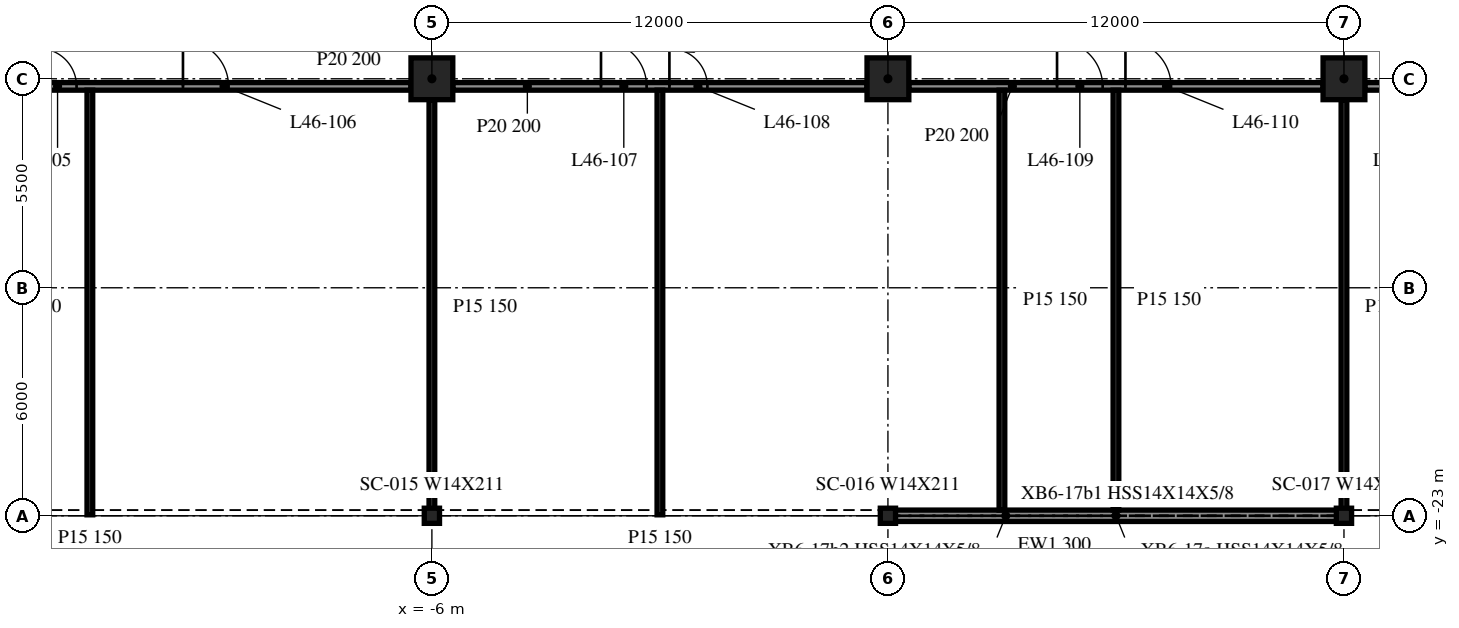
"""IFC4 building model, lengths in metres.
Left out: names, types, materials, properties, quantities, classifications, styles, units other than length and angle.
Written with IfcOpenShell. Run it as: python <this file> out.ifc"""

import sys

from ifc_helpers import new_model, si_unit, direction, frame, frame_2d, origin, origin_2d, place, context, subcontext, project, spatial, rectangle, i_section, extrude, element, fill, save


model = new_model("IFC4")
c1 = context("Model", 3, precision=1e-05, world=origin(), true_north=direction((0.0, 1.0)))
c2 = subcontext(c1, "Body", "Model", "MODEL_VIEW")
j1 = project(units=[si_unit("LENGTHUNIT", "METRE"), si_unit("PLANEANGLEUNIT", "RADIAN")], contexts=[c1])
p1 = place(None, origin())
s1 = spatial("IfcSite", under=j1, at=p1, CompositionType="ELEMENT")
p2 = place(p1, origin())
s2 = spatial("IfcBuilding", under=s1, at=p2, CompositionType="ELEMENT")
p3 = place(p2, frame((0.0, 0.0, 193.9)))
s3 = spatial("IfcBuildingStorey", under=s2, at=p3, CompositionType="ELEMENT", Elevation=193.9)
for number, where, z_axis, x_axis in (
    (1, (-6.0, -11.5, -0.34), (0.0, 0.0, 1.0), (1.0, 0.0, 0.0)),
    (2, (6.0, -11.5, -0.34), (0.0, 0.0, 1.0), (1.0, 0.0, 0.0)),
    (3, (18.0, -11.5, -0.34), (0.0, 0.0, 1.0), (1.0, 0.0, 0.0)),
):
    element("IfcColumn", number, at=place(p3, frame(where, z_axis=z_axis, x_axis=x_axis)), inside=s3, PredefinedType="COLUMN", context=c2, shape_type="SweptSolid", body=[
        extrude(rectangle(XDim=1.1, YDim=1.1, at=origin_2d()), origin(), (0.0, 0.0, 1.0), 3.8),
    ])
for number, where, z_axis, x_axis in (
    (4, (-6.0, -23.0, -0.34), (0.0, 0.0, 1.0), (1.0, 0.0, 0.0)),
    (5, (6.0, -23.0, -0.34), (0.0, 0.0, 1.0), (1.0, 0.0, 0.0)),
    (6, (18.0, -23.0, -0.34), (0.0, 0.0, 1.0), (1.0, 0.0, 0.0)),
):
    element("IfcColumn", number, at=place(p3, frame(where, z_axis=z_axis, x_axis=x_axis)), inside=s3, PredefinedType="COLUMN", context=c2, shape_type="SweptSolid", body=[
        extrude(i_section(OverallWidth=0.401, OverallDepth=0.399, WebThickness=0.025, FlangeThickness=0.04, at=origin_2d()), origin(), (0.0, 0.0, 1.0), 3.8),
    ])
p4 = place(p3, frame((6.012, -23.0, 0.0), z_axis=(0.0, 0.0, 1.0), x_axis=(1.0, 0.0, 0.0)))
e7 = element("IfcWall", 7, at=p4, inside=s3, PredefinedType="NOTDEFINED", context=c2, shape_type="SweptSolid", body=[
    extrude(rectangle(XDim=11.975, YDim=0.3, at=frame_2d((5.988, 0.0))), origin(), (0.0, 0.0, 1.0), 2.782),
])
p5 = place(p3, frame((-17.45, -11.7, 0.0), z_axis=(0.0, 0.0, 1.0), x_axis=(1.0, 0.0, 0.0)))
e8 = element("IfcWall", 8, at=p5, inside=s3, PredefinedType="PARTITIONING", context=c2, shape_type="SweptSolid", body=[
    extrude(rectangle(XDim=10.9, YDim=0.2, at=frame_2d((5.45, 0.0))), origin(), (0.0, 0.0, 1.0), 3.46),
])
p6 = place(p5, frame((1.1, 0.0, 0.0)))
e9 = element("IfcOpeningElement", 9, at=p6, cuts=e8, PredefinedType="OPENING", context=c2, shape_type="SweptSolid", body=[
    extrude(rectangle(XDim=1.0, YDim=2.1, at=frame_2d((0.5, 1.05))), frame((0.0, 0.11, 0.0), z_axis=(0.0, -1.0, 0.0), x_axis=(1.0, 0.0, 0.0)), (0.0, 0.0, 1.0), 0.22),
])
p7 = place(p5, frame((4.9, 0.0, 0.0)))
e10 = element("IfcOpeningElement", 10, at=p7, cuts=e8, PredefinedType="OPENING", context=c2, shape_type="SweptSolid", body=[
    extrude(rectangle(XDim=1.2, YDim=2.1, at=frame_2d((0.6, 1.05))), frame((0.0, 0.11, 0.0), z_axis=(0.0, -1.0, 0.0), x_axis=(1.0, 0.0, 0.0)), (0.0, 0.0, 1.0), 0.22),
])
p8 = place(p3, frame((-5.45, -11.7, 0.0), z_axis=(0.0, 0.0, 1.0), x_axis=(1.0, 0.0, 0.0)))
e11 = element("IfcWall", 11, at=p8, inside=s3, PredefinedType="PARTITIONING", context=c2, shape_type="SweptSolid", body=[
    extrude(rectangle(XDim=10.9, YDim=0.2, at=frame_2d((5.45, 0.0))), origin(), (0.0, 0.0, 1.0), 3.46),
])
p9 = place(p8, frame((3.9, 0.0, 0.0)))
e12 = element("IfcOpeningElement", 12, at=p9, cuts=e11, PredefinedType="OPENING", context=c2, shape_type="SweptSolid", body=[
    extrude(rectangle(XDim=1.2, YDim=2.1, at=frame_2d((0.6, 1.05))), frame((0.0, 0.11, 0.0), z_axis=(0.0, -1.0, 0.0), x_axis=(1.0, 0.0, 0.0)), (0.0, 0.0, 1.0), 0.22),
])
p10 = place(p8, frame((5.7, 0.0, 0.0)))
e13 = element("IfcOpeningElement", 13, at=p10, cuts=e11, PredefinedType="OPENING", context=c2, shape_type="SweptSolid", body=[
    extrude(rectangle(XDim=1.0, YDim=2.1, at=frame_2d((0.5, 1.05))), frame((0.0, 0.11, 0.0), z_axis=(0.0, -1.0, 0.0), x_axis=(1.0, 0.0, 0.0)), (0.0, 0.0, 1.0), 0.22),
])
p11 = place(p3, frame((6.55, -11.7, 0.0), z_axis=(0.0, 0.0, 1.0), x_axis=(1.0, 0.0, 0.0)))
e14 = element("IfcWall", 14, at=p11, inside=s3, PredefinedType="PARTITIONING", context=c2, shape_type="SweptSolid", body=[
    extrude(rectangle(XDim=10.9, YDim=0.2, at=frame_2d((5.45, 0.0))), origin(), (0.0, 0.0, 1.0), 3.46),
])
p12 = place(p11, frame((3.9, 0.0, 0.0)))
e15 = element("IfcOpeningElement", 15, at=p12, cuts=e14, PredefinedType="OPENING", context=c2, shape_type="SweptSolid", body=[
    extrude(rectangle(XDim=1.2, YDim=2.1, at=frame_2d((0.6, 1.05))), frame((0.0, 0.11, 0.0), z_axis=(0.0, -1.0, 0.0), x_axis=(1.0, 0.0, 0.0)), (0.0, 0.0, 1.0), 0.22),
])
p13 = place(p11, frame((5.7, 0.0, 0.0)))
e16 = element("IfcOpeningElement", 16, at=p13, cuts=e14, PredefinedType="OPENING", context=c2, shape_type="SweptSolid", body=[
    extrude(rectangle(XDim=1.2, YDim=2.1, at=frame_2d((0.6, 1.05))), frame((0.0, 0.11, 0.0), z_axis=(0.0, -1.0, 0.0), x_axis=(1.0, 0.0, 0.0)), (0.0, 0.0, 1.0), 0.22),
])
p14 = place(p3, frame((18.55, -11.7, 0.0), z_axis=(0.0, 0.0, 1.0), x_axis=(1.0, 0.0, 0.0)))
e17 = element("IfcWall", 17, at=p14, inside=s3, PredefinedType="PARTITIONING", context=c2, shape_type="SweptSolid", body=[
    extrude(rectangle(XDim=10.9, YDim=0.2, at=frame_2d((5.45, 0.0))), origin(), (0.0, 0.0, 1.0), 3.46),
])
p15 = place(p14, frame((1.1, 0.0, 0.0)))
e18 = element("IfcOpeningElement", 18, at=p15, cuts=e17, PredefinedType="OPENING", context=c2, shape_type="SweptSolid", body=[
    extrude(rectangle(XDim=1.0, YDim=2.1, at=frame_2d((0.5, 1.05))), frame((0.0, 0.11, 0.0), z_axis=(0.0, -1.0, 0.0), x_axis=(1.0, 0.0, 0.0)), (0.0, 0.0, 1.0), 0.22),
])
p16 = place(p14, frame((4.9, 0.0, 0.0)))
e19 = element("IfcOpeningElement", 19, at=p16, cuts=e17, PredefinedType="OPENING", context=c2, shape_type="SweptSolid", body=[
    extrude(rectangle(XDim=1.2, YDim=2.1, at=frame_2d((0.6, 1.05))), frame((0.0, 0.11, 0.0), z_axis=(0.0, -1.0, 0.0), x_axis=(1.0, 0.0, 0.0)), (0.0, 0.0, 1.0), 0.22),
])
p17 = place(p3, frame((-15.0, -22.975, 0.0), z_axis=(0.0, 0.0, 1.0), x_axis=(0.0, 1.0, 0.0)))
e20 = element("IfcWall", 20, at=p17, inside=s3, PredefinedType="PARTITIONING", context=c2, shape_type="SweptSolid", body=[
    extrude(rectangle(XDim=11.175, YDim=0.15, at=frame_2d((5.587, 0.0))), origin(), (0.0, 0.0, 1.0), 3.46),
])
p18 = place(p3, frame((-6.0, -22.975, 0.0), z_axis=(0.0, 0.0, 1.0), x_axis=(0.0, 1.0, 0.0)))
e21 = element("IfcWall", 21, at=p18, inside=s3, PredefinedType="PARTITIONING", context=c2, shape_type="SweptSolid", body=[
    extrude(rectangle(XDim=10.925, YDim=0.15, at=frame_2d((5.462, 0.0))), origin(), (0.0, 0.0, 1.0), 3.46),
])
p19 = place(p3, frame((0.0, -22.975, 0.0), z_axis=(0.0, 0.0, 1.0), x_axis=(0.0, 1.0, 0.0)))
e22 = element("IfcWall", 22, at=p19, inside=s3, PredefinedType="PARTITIONING", context=c2, shape_type="SweptSolid", body=[
    extrude(rectangle(XDim=11.175, YDim=0.15, at=frame_2d((5.587, 0.0))), origin(), (0.0, 0.0, 1.0), 3.46),
])
for number, where, z_axis, x_axis in (
    (23, (9.0, -22.85, 0.0), (0.0, 0.0, 1.0), (0.0, 1.0, 0.0)),
    (24, (12.0, -22.85, 0.0), (0.0, 0.0, 1.0), (0.0, 1.0, 0.0)),
):
    element("IfcWall", number, at=place(p3, frame(where, z_axis=z_axis, x_axis=x_axis)), inside=s3, PredefinedType="PARTITIONING", context=c2, shape_type="SweptSolid", body=[
        extrude(rectangle(XDim=11.05, YDim=0.15, at=frame_2d((5.525, 0.0))), origin(), (0.0, 0.0, 1.0), 3.46),
    ])
p20 = place(p3, frame((18.0, -22.975, 0.0), z_axis=(0.0, 0.0, 1.0), x_axis=(0.0, 1.0, 0.0)))
e25 = element("IfcWall", 25, at=p20, inside=s3, PredefinedType="PARTITIONING", context=c2, shape_type="SweptSolid", body=[
    extrude(rectangle(XDim=10.925, YDim=0.15, at=frame_2d((5.462, 0.0))), origin(), (0.0, 0.0, 1.0), 3.46),
])
p21 = place(p6, origin())
e26 = element("IfcDoor", 26, at=p21, inside=s3, OperationType="SINGLE_SWING_RIGHT", PredefinedType="DOOR", context=c2, shape_type="SweptSolid", body=[
    extrude(rectangle(XDim=1.0, YDim=2.1, at=frame_2d((0.5, 1.05))), frame((0.0, 0.025, 0.0), z_axis=(0.0, -1.0, 0.0), x_axis=(1.0, 0.0, 0.0)), (0.0, 0.0, 1.0), 0.05),
])
fill(e9, e26)
p22 = place(p7, origin())
e27 = element("IfcDoor", 27, at=p22, inside=s3, OperationType="SINGLE_SWING_LEFT", PredefinedType="DOOR", context=c2, shape_type="SweptSolid", body=[
    extrude(rectangle(XDim=1.2, YDim=2.1, at=frame_2d((0.6, 1.05))), frame((0.0, 0.025, 0.0), z_axis=(0.0, -1.0, 0.0), x_axis=(1.0, 0.0, 0.0)), (0.0, 0.0, 1.0), 0.05),
])
fill(e10, e27)
p23 = place(p9, origin())
e28 = element("IfcDoor", 28, at=p23, inside=s3, OperationType="SINGLE_SWING_RIGHT", PredefinedType="DOOR", context=c2, shape_type="SweptSolid", body=[
    extrude(rectangle(XDim=1.2, YDim=2.1, at=frame_2d((0.6, 1.05))), frame((0.0, 0.025, 0.0), z_axis=(0.0, -1.0, 0.0), x_axis=(1.0, 0.0, 0.0)), (0.0, 0.0, 1.0), 0.05),
])
fill(e12, e28)
p24 = place(p10, origin())
e29 = element("IfcDoor", 29, at=p24, inside=s3, OperationType="SINGLE_SWING_LEFT", PredefinedType="DOOR", context=c2, shape_type="SweptSolid", body=[
    extrude(rectangle(XDim=1.0, YDim=2.1, at=frame_2d((0.5, 1.05))), frame((0.0, 0.025, 0.0), z_axis=(0.0, -1.0, 0.0), x_axis=(1.0, 0.0, 0.0)), (0.0, 0.0, 1.0), 0.05),
])
fill(e13, e29)
p25 = place(p12, origin())
e30 = element("IfcDoor", 30, at=p25, inside=s3, OperationType="SINGLE_SWING_RIGHT", PredefinedType="DOOR", context=c2, shape_type="SweptSolid", body=[
    extrude(rectangle(XDim=1.2, YDim=2.1, at=frame_2d((0.6, 1.05))), frame((0.0, 0.025, 0.0), z_axis=(0.0, -1.0, 0.0), x_axis=(1.0, 0.0, 0.0)), (0.0, 0.0, 1.0), 0.05),
])
fill(e15, e30)
p26 = place(p13, origin())
e31 = element("IfcDoor", 31, at=p26, inside=s3, OperationType="SINGLE_SWING_LEFT", PredefinedType="DOOR", context=c2, shape_type="SweptSolid", body=[
    extrude(rectangle(XDim=1.2, YDim=2.1, at=frame_2d((0.6, 1.05))), frame((0.0, 0.025, 0.0), z_axis=(0.0, -1.0, 0.0), x_axis=(1.0, 0.0, 0.0)), (0.0, 0.0, 1.0), 0.05),
])
fill(e16, e31)
save(model, sys.argv[1])
